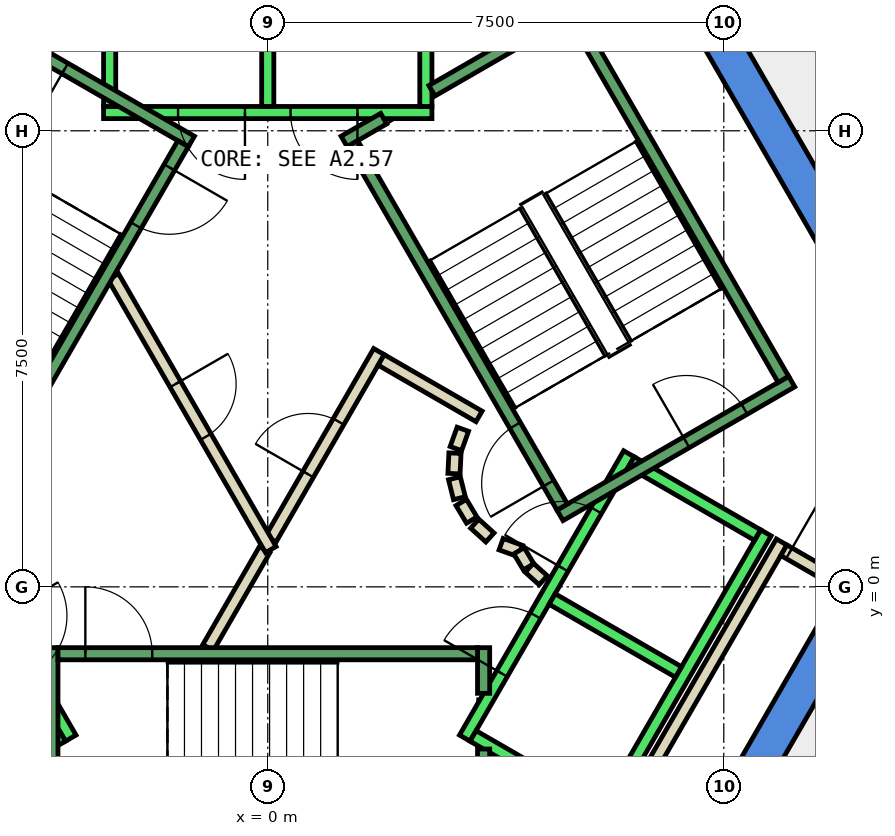
"""IFC4 building model, lengths in metres.
Left out: names, types, materials, properties, quantities, classifications, styles, units other than length and angle.
Written with IfcOpenShell. Run it as: python <this file> out.ifc"""

import sys

from ifc_helpers import new_model, si_unit, direction, frame, frame_2d, origin, place, context, subcontext, project, spatial, polyline, rectangle, outline, extrude, element, fill, save


model = new_model("IFC4")
c1 = context("Model", 3, precision=1e-05, world=origin(), true_north=direction((0.0, 1.0)))
c2 = subcontext(c1, "Body", "Model", "MODEL_VIEW")
j1 = project(units=[si_unit("LENGTHUNIT", "METRE"), si_unit("PLANEANGLEUNIT", "RADIAN")], contexts=[c1])
p1 = place(None, origin())
s1 = spatial("IfcSite", under=j1, at=p1, CompositionType="ELEMENT")
p2 = place(p1, origin())
s2 = spatial("IfcBuilding", under=s1, at=p2, CompositionType="ELEMENT")
p3 = place(p2, frame((0.0, 0.0, 270.2)))
s3 = spatial("IfcBuildingStorey", under=s2, at=p3, CompositionType="ELEMENT", Elevation=270.2)
p4 = place(p3, frame((0.0, 0.0, -0.34)))
e1 = element("IfcWall", 1, at=p4, inside=s3, PredefinedType="SHEAR", context=c2, shape_type="SweptSolid", body=[
    extrude(outline(polyline([(6.786, 10.747), (6.266, 10.447), (10.854, 2.5), (11.547, 2.5), (6.786, 10.747)])), origin(), (0.0, 0.0, 1.0), 3.6),
])
p5 = place(p3, frame((0.0, 0.0, -0.34)))
e2 = element("IfcWall", 2, at=p5, inside=s3, PredefinedType="SHEAR", context=c2, shape_type="SweptSolid", body=[
    extrude(outline(polyline([(5.774, -7.5), (11.547, 2.5), (10.854, 2.5), (5.427, -6.9), (5.774, -7.5)])), origin(), (0.0, 0.0, 1.0), 3.6),
])
p6 = place(p3, frame((5.751, -3.938, 0.0), z_axis=(0.0, 0.0, 1.0), x_axis=(0.500034260056, 0.866005622828, 0.0)))
e3 = element("IfcWall", 3, at=p6, inside=s3, PredefinedType="PARTITIONING", context=c2, shape_type="SweptSolid", body=[
    extrude(rectangle(XDim=5.399, YDim=0.2, at=frame_2d((2.7, 0.0))), origin(), (0.0, 0.0, 1.0), 3.26),
])
p7 = place(p3, frame((8.488, 0.602, 0.0), z_axis=(0.0, 0.0, 1.0), x_axis=(0.866063652425, -0.499933745558, 0.0)))
e4 = element("IfcWall", 4, at=p7, inside=s3, PredefinedType="PARTITIONING", context=c2, shape_type="SweptSolid", body=[
    extrude(rectangle(XDim=1.1, YDim=0.2, at=frame_2d((0.55, 0.0))), origin(), (0.0, 0.0, 1.0), 3.26),
])
p8 = place(p7, frame((0.1, 0.0, 0.0)))
e5 = element("IfcOpeningElement", 5, at=p8, cuts=e4, PredefinedType="OPENING", context=c2, shape_type="SweptSolid", body=[
    extrude(rectangle(XDim=0.9, YDim=2.1, at=frame_2d((0.45, 1.05))), frame((0.0, 0.11, 0.0), z_axis=(0.0, -1.0, 0.0), x_axis=(1.0, 0.0, 0.0)), (0.0, 0.0, 1.0), 0.22),
])
p9 = place(p3, frame((-0.982, -1.0, 0.0), z_axis=(0.0, 0.0, 1.0), x_axis=(0.50024047865, 0.865886518847, 0.0)))
e6 = element("IfcWall", 6, at=p9, inside=s3, PredefinedType="PARTITIONING", context=c2, shape_type="SweptSolid", body=[
    extrude(rectangle(XDim=1.863, YDim=0.2, at=frame_2d((0.931, 0.0))), origin(), (0.0, 0.0, 1.0), 3.26),
])
p10 = place(p3, frame((0.05, 0.787, 0.0), z_axis=(0.0, 0.0, 1.0), x_axis=(0.499954076797, 0.866051915934, 0.0)))
e7 = element("IfcWall", 7, at=p10, inside=s3, PredefinedType="PARTITIONING", context=c2, shape_type="SweptSolid", body=[
    extrude(rectangle(XDim=3.558, YDim=0.2, at=frame_2d((1.779, 0.0))), origin(), (0.0, 0.0, 1.0), 3.26),
])
p11 = place(p10, frame((1.229, 0.0, 0.0)))
e8 = element("IfcOpeningElement", 8, at=p11, cuts=e7, PredefinedType="OPENING", context=c2, shape_type="SweptSolid", body=[
    extrude(rectangle(XDim=1.0, YDim=2.1, at=frame_2d((0.5, 1.05))), frame((0.0, 0.11, 0.0), z_axis=(0.0, -1.0, 0.0), x_axis=(1.0, 0.0, 0.0)), (0.0, 0.0, 1.0), 0.22),
])
p12 = place(p3, frame((1.866, 3.732, 0.0), z_axis=(0.0, 0.0, 1.0), x_axis=(0.866043361281, -0.499968895414, 0.0)))
e9 = element("IfcWall", 9, at=p12, inside=s3, PredefinedType="PARTITIONING", context=c2, shape_type="SweptSolid", body=[
    extrude(rectangle(XDim=1.858, YDim=0.2, at=frame_2d((0.929, 0.0))), origin(), (0.0, 0.0, 1.0), 3.26),
])
p13 = place(p3, frame((3.208, 2.592, 0.0), z_axis=(0.0, 0.0, 1.0), x_axis=(-0.337388820924, -0.941365382578, 0.0)))
e10 = element("IfcWall", 10, at=p13, inside=s3, PredefinedType="PARTITIONING", context=c2, shape_type="SweptSolid", body=[
    extrude(rectangle(XDim=0.338, YDim=0.2, at=frame_2d((0.169, 0.0))), origin(), (0.0, 0.0, 1.0), 3.26),
])
p14 = place(p3, frame((3.079, 2.199, 0.0), z_axis=(0.0, 0.0, 1.0), x_axis=(-0.047771483479, -0.998858290933, 0.0)))
e11 = element("IfcWall", 11, at=p14, inside=s3, PredefinedType="PARTITIONING", context=c2, shape_type="SweptSolid", body=[
    extrude(rectangle(XDim=0.337, YDim=0.2, at=frame_2d((0.169, 0.0))), origin(), (0.0, 0.0, 1.0), 3.26),
])
p15 = place(p3, frame((3.07, 1.786, 0.0), z_axis=(0.0, 0.0, 1.0), x_axis=(0.242705583207, -0.970099994784, 0.0)))
e12 = element("IfcWall", 12, at=p15, inside=s3, PredefinedType="PARTITIONING", context=c2, shape_type="SweptSolid", body=[
    extrude(rectangle(XDim=0.338, YDim=0.2, at=frame_2d((0.169, 0.0))), origin(), (0.0, 0.0, 1.0), 3.26),
])
for number, where, z_axis, x_axis in (
    (13, (3.182, 1.388, 0.0), (0.0, 0.0, 1.0), (0.512, -0.859, 0.0)),
    (14, (3.404, 1.039, 0.0), (0.0, 0.0, 1.0), (0.74, -0.672, 0.0)),
):
    element("IfcWall", number, at=place(p3, frame(where, z_axis=z_axis, x_axis=x_axis)), inside=s3, PredefinedType="PARTITIONING", context=c2, shape_type="SweptSolid", body=[
        extrude(rectangle(XDim=0.338, YDim=0.2, at=frame_2d((0.169, 0.0))), origin(), (0.0, 0.0, 1.0), 3.26),
    ])
p16 = place(p3, frame((3.838, 0.702, 0.0), z_axis=(0.0, 0.0, 1.0), x_axis=(0.941035081519, -0.338308993895, 0.0)))
e15 = element("IfcWall", 15, at=p16, inside=s3, PredefinedType="PARTITIONING", context=c2, shape_type="SweptSolid", body=[
    extrude(rectangle(XDim=0.337, YDim=0.2, at=frame_2d((0.168, 0.0))), origin(), (0.0, 0.0, 1.0), 3.26),
])
p17 = place(p3, frame((4.132, 0.593, 0.0), z_axis=(0.0, 0.0, 1.0), x_axis=(0.513561617048, -0.858052717201, 0.0)))
e16 = element("IfcWall", 16, at=p17, inside=s3, PredefinedType="PARTITIONING", context=c2, shape_type="SweptSolid", body=[
    extrude(rectangle(XDim=0.308, YDim=0.2, at=frame_2d((0.154, 0.0))), origin(), (0.0, 0.0, 1.0), 3.26),
])
p18 = place(p3, frame((4.301, 0.315, 0.0), z_axis=(0.0, 0.0, 1.0), x_axis=(0.741798017506, -0.670623367639, 0.0)))
e17 = element("IfcWall", 17, at=p18, inside=s3, PredefinedType="PARTITIONING", context=c2, shape_type="SweptSolid", body=[
    extrude(rectangle(XDim=0.309, YDim=0.2, at=frame_2d((0.154, 0.0))), origin(), (0.0, 0.0, 1.0), 3.26),
])
p19 = place(p3, frame((-2.54, 5.1, 0.0), z_axis=(0.0, 0.0, 1.0), x_axis=(0.499925051871, -0.866068670783, 0.0)))
e18 = element("IfcWall", 18, at=p19, inside=s3, PredefinedType="PARTITIONING", context=c2, shape_type="SweptSolid", body=[
    extrude(rectangle(XDim=5.181, YDim=0.2, at=frame_2d((2.59, 0.0))), origin(), (0.0, 0.0, 1.0), 3.26),
])
p20 = place(p19, frame((2.04, 0.0, 0.0)))
e19 = element("IfcOpeningElement", 19, at=p20, cuts=e18, PredefinedType="OPENING", context=c2, shape_type="SweptSolid", body=[
    extrude(rectangle(XDim=1.0, YDim=2.1, at=frame_2d((0.5, 1.05))), frame((0.0, 0.11, 0.0), z_axis=(0.0, -1.0, 0.0), x_axis=(1.0, 0.0, 0.0)), (0.0, 0.0, 1.0), 0.22),
])
p21 = place(p3, frame((2.7, 7.8, 0.0), z_axis=(0.0, 0.0, 1.0), x_axis=(-1.0, 0.0, 0.0)))
e20 = element("IfcWall", 20, at=p21, inside=s3, PredefinedType="STANDARD", context=c2, shape_type="SweptSolid", body=[
    extrude(rectangle(XDim=5.4, YDim=0.2, at=frame_2d((2.7, 0.0))), origin(), (0.0, 0.0, 1.0), 3.26),
])
p22 = place(p21, frame((1.225, 0.0, 0.0)))
e21 = element("IfcOpeningElement", 21, at=p22, cuts=e20, PredefinedType="OPENING", context=c2, shape_type="SweptSolid", body=[
    extrude(rectangle(XDim=1.1, YDim=2.1, at=frame_2d((0.55, 1.05))), frame((0.0, 0.11, 0.0), z_axis=(0.0, -1.0, 0.0), x_axis=(1.0, 0.0, 0.0)), (0.0, 0.0, 1.0), 0.22),
])
p23 = place(p21, frame((3.075, 0.0, 0.0)))
e22 = element("IfcOpeningElement", 22, at=p23, cuts=e20, PredefinedType="OPENING", context=c2, shape_type="SweptSolid", body=[
    extrude(rectangle(XDim=1.1, YDim=2.1, at=frame_2d((0.55, 1.05))), frame((0.0, 0.11, 0.0), z_axis=(0.0, -1.0, 0.0), x_axis=(1.0, 0.0, 0.0)), (0.0, 0.0, 1.0), 0.22),
])
for number, where, z_axis, x_axis in (
    (23, (2.6, 7.9, 0.0), (0.0, 0.0, 1.0), (0.0, 1.0, 0.0)),
    (24, (0.0, 7.9, 0.0), (0.0, 0.0, 1.0), (0.0, 1.0, 0.0)),
    (25, (-2.6, 7.9, 0.0), (0.0, 0.0, 1.0), (0.0, 1.0, 0.0)),
):
    element("IfcWall", number, at=place(p3, frame(where, z_axis=z_axis, x_axis=x_axis)), inside=s3, PredefinedType="STANDARD", context=c2, shape_type="SweptSolid", body=[
        extrude(rectangle(XDim=2.4, YDim=0.2, at=frame_2d((1.2, 0.0))), origin(), (0.0, 0.0, 1.0), 3.26),
    ])
p24 = place(p3, frame((-5.94, 2.188, 0.0), z_axis=(0.0, 0.0, 1.0), x_axis=(0.500034260056, -0.866005622828, 0.0)))
e26 = element("IfcWall", 26, at=p24, inside=s3, PredefinedType="STANDARD", context=c2, shape_type="SweptSolid", body=[
    extrude(rectangle(XDim=5.399, YDim=0.2, at=frame_2d((2.7, 0.0))), origin(), (0.0, 0.0, 1.0), 3.26),
])
p25 = place(p24, frame((3.075, 0.0, 0.0)))
e27 = element("IfcOpeningElement", 27, at=p25, cuts=e26, PredefinedType="OPENING", context=c2, shape_type="SweptSolid", body=[
    extrude(rectangle(XDim=1.1, YDim=2.1, at=frame_2d((0.55, 1.05))), frame((0.0, 0.11, 0.0), z_axis=(0.0, -1.0, 0.0), x_axis=(1.0, 0.0, 0.0)), (0.0, 0.0, 1.0), 0.22),
])
p26 = place(p24, frame((1.225, 0.0, 0.0)))
e28 = element("IfcOpeningElement", 28, at=p26, cuts=e26, PredefinedType="OPENING", context=c2, shape_type="SweptSolid", body=[
    extrude(rectangle(XDim=1.1, YDim=2.1, at=frame_2d((0.55, 1.05))), frame((0.0, 0.11, 0.0), z_axis=(0.0, -1.0, 0.0), x_axis=(1.0, 0.0, 0.0)), (0.0, 0.0, 1.0), 0.22),
])
p27 = place(p3, frame((-3.377, -2.452, 0.0), z_axis=(0.0, 0.0, 1.0), x_axis=(-0.865955154139, -0.50012165622, 0.0)))
e29 = element("IfcWall", 29, at=p27, inside=s3, PredefinedType="STANDARD", context=c2, shape_type="SweptSolid", body=[
    extrude(rectangle(XDim=2.4, YDim=0.2, at=frame_2d((1.2, 0.0))), origin(), (0.0, 0.0, 1.0), 3.26),
])
p28 = place(p3, frame((3.24, -2.488, 0.0), z_axis=(0.0, 0.0, 1.0), x_axis=(0.500034260056, 0.866005622828, 0.0)))
e30 = element("IfcWall", 30, at=p28, inside=s3, PredefinedType="STANDARD", context=c2, shape_type="SweptSolid", body=[
    extrude(rectangle(XDim=5.399, YDim=0.2, at=frame_2d((2.7, 0.0))), origin(), (0.0, 0.0, 1.0), 3.26),
])
p29 = place(p28, frame((3.225, 0.0, 0.0)))
e31 = element("IfcOpeningElement", 31, at=p29, cuts=e30, PredefinedType="OPENING", context=c2, shape_type="SweptSolid", body=[
    extrude(rectangle(XDim=1.1, YDim=2.1, at=frame_2d((0.55, 1.05))), frame((0.0, 0.11, 0.0), z_axis=(0.0, -1.0, 0.0), x_axis=(1.0, 0.0, 0.0)), (0.0, 0.0, 1.0), 0.22),
])
p30 = place(p28, frame((1.225, 0.0, 0.0)))
e32 = element("IfcOpeningElement", 32, at=p30, cuts=e30, PredefinedType="OPENING", context=c2, shape_type="SweptSolid", body=[
    extrude(rectangle(XDim=1.1, YDim=2.1, at=frame_2d((0.55, 1.05))), frame((0.0, 0.11, 0.0), z_axis=(0.0, -1.0, 0.0), x_axis=(1.0, 0.0, 0.0)), (0.0, 0.0, 1.0), 0.22),
])
p31 = place(p3, frame((5.492, -3.788, 0.0), z_axis=(0.0, 0.0, 1.0), x_axis=(0.500034260056, 0.866005622828, 0.0)))
e33 = element("IfcWall", 33, at=p31, inside=s3, PredefinedType="STANDARD", context=c2, shape_type="SweptSolid", body=[
    extrude(rectangle(XDim=5.399, YDim=0.2, at=frame_2d((2.7, 0.0))), origin(), (0.0, 0.0, 1.0), 3.26),
])
p32 = place(p3, frame((3.377, -2.452, 0.0), z_axis=(0.0, 0.0, 1.0), x_axis=(0.865955154139, -0.50012165622, 0.0)))
e34 = element("IfcWall", 34, at=p32, inside=s3, PredefinedType="STANDARD", context=c2, shape_type="SweptSolid", body=[
    extrude(rectangle(XDim=2.4, YDim=0.2, at=frame_2d((1.2, 0.0))), origin(), (0.0, 0.0, 1.0), 3.26),
])
for number, where, z_axis, x_axis in (
    (35, (4.677, -0.2, 0.0), (0.0, 0.0, 1.0), (0.866, -0.5, 0.0)),
    (36, (5.977, 2.052, 0.0), (0.0, 0.0, 1.0), (0.866, -0.5, 0.0)),
):
    element("IfcWall", number, at=place(p3, frame(where, z_axis=z_axis, x_axis=x_axis)), inside=s3, PredefinedType="STANDARD", context=c2, shape_type="SweptSolid", body=[
        extrude(rectangle(XDim=2.399, YDim=0.2, at=frame_2d((1.2, 0.0))), origin(), (0.0, 0.0, 1.0), 3.26),
    ])
p33 = place(p3, frame((-3.55, -1.0, 0.0), z_axis=(0.0, 0.0, 1.0), x_axis=(0.0, -1.0, 0.0)))
e37 = element("IfcWall", 37, at=p33, inside=s3, PredefinedType="STANDARD", context=c2, shape_type="SweptSolid", body=[
    extrude(rectangle(XDim=4.4, YDim=0.2, at=frame_2d((2.2, 0.0))), origin(), (0.0, 0.0, 1.0), 3.26),
])
p34 = place(p33, frame((2.4, 0.0, 0.0)))
e38 = element("IfcOpeningElement", 38, at=p34, cuts=e37, PredefinedType="OPENING", context=c2, shape_type="SweptSolid", body=[
    extrude(rectangle(XDim=1.1, YDim=2.2, at=frame_2d((0.55, 1.1))), frame((0.0, 0.11, 0.0), z_axis=(0.0, -1.0, 0.0), x_axis=(1.0, 0.0, 0.0)), (0.0, 0.0, 1.0), 0.22),
])
p35 = place(p3, frame((3.55, -2.667, 0.0), z_axis=(0.0, 0.0, 1.0), x_axis=(0.0, -1.0, 0.0)))
e39 = element("IfcWall", 39, at=p35, inside=s3, PredefinedType="STANDARD", context=c2, shape_type="SweptSolid", body=[
    extrude(rectangle(XDim=2.733, YDim=0.2, at=frame_2d((1.366, 0.0))), origin(), (0.0, 0.0, 1.0), 3.26),
])
p36 = place(p3, frame((3.55, -1.0, 0.0), z_axis=(0.0, 0.0, 1.0), x_axis=(0.0, -1.0, 0.0)))
e40 = element("IfcWall", 40, at=p36, inside=s3, PredefinedType="STANDARD", context=c2, shape_type="SweptSolid", body=[
    extrude(rectangle(XDim=0.751, YDim=0.2, at=frame_2d((0.375, 0.0))), origin(), (0.0, 0.0, 1.0), 3.26),
])
p37 = place(p3, frame((-3.45, -1.1, 0.0), z_axis=(0.0, 0.0, 1.0), x_axis=(1.0, 0.0, 0.0)))
e41 = element("IfcWall", 41, at=p37, inside=s3, PredefinedType="STANDARD", context=c2, shape_type="SweptSolid", body=[
    extrude(rectangle(XDim=6.9, YDim=0.2, at=frame_2d((3.45, 0.0))), origin(), (0.0, 0.0, 1.0), 3.26),
])
p38 = place(p37, frame((0.45, 0.0, 0.0)))
e42 = element("IfcOpeningElement", 42, at=p38, cuts=e41, PredefinedType="OPENING", context=c2, shape_type="SweptSolid", body=[
    extrude(rectangle(XDim=1.1, YDim=2.2, at=frame_2d((0.55, 1.1))), frame((0.0, 0.11, 0.0), z_axis=(0.0, -1.0, 0.0), x_axis=(1.0, 0.0, 0.0)), (0.0, 0.0, 1.0), 0.22),
])
p39 = place(p3, frame((4.806, 1.176, 0.0), z_axis=(0.0, 0.0, 1.0), x_axis=(0.866059941101, 0.499940174841, 0.0)))
e43 = element("IfcWall", 43, at=p39, inside=s3, PredefinedType="STANDARD", context=c2, shape_type="SweptSolid", body=[
    extrude(rectangle(XDim=4.4, YDim=0.2, at=frame_2d((2.2, 0.0))), origin(), (0.0, 0.0, 1.0), 3.26),
])
p40 = place(p39, frame((2.4, 0.0, 0.0)))
e44 = element("IfcOpeningElement", 44, at=p40, cuts=e43, PredefinedType="OPENING", context=c2, shape_type="SweptSolid", body=[
    extrude(rectangle(XDim=1.1, YDim=2.2, at=frame_2d((0.55, 1.1))), frame((0.0, 0.11, 0.0), z_axis=(0.0, -1.0, 0.0), x_axis=(1.0, 0.0, 0.0)), (0.0, 0.0, 1.0), 0.22),
])
p41 = place(p3, frame((2.7, 8.158, 0.0), z_axis=(0.0, 0.0, 1.0), x_axis=(0.86611865017, 0.499838457731, 0.0)))
e45 = element("IfcWall", 45, at=p41, inside=s3, PredefinedType="STANDARD", context=c2, shape_type="SweptSolid", body=[
    extrude(rectangle(XDim=2.733, YDim=0.2, at=frame_2d((1.366, 0.0))), origin(), (0.0, 0.0, 1.0), 3.26),
])
p42 = place(p3, frame((1.256, 7.324, 0.0), z_axis=(0.0, 0.0, 1.0), x_axis=(0.865915093549, 0.500191014278, 0.0)))
e46 = element("IfcWall", 46, at=p42, inside=s3, PredefinedType="STANDARD", context=c2, shape_type="SweptSolid", body=[
    extrude(rectangle(XDim=0.752, YDim=0.2, at=frame_2d((0.376, 0.0))), origin(), (0.0, 0.0, 1.0), 3.26),
])
p43 = place(p3, frame((4.843, 1.312, 0.0), z_axis=(0.0, 0.0, 1.0), x_axis=(-0.499963383562, 0.866046543262, 0.0)))
e47 = element("IfcWall", 47, at=p43, inside=s3, PredefinedType="STANDARD", context=c2, shape_type="SweptSolid", body=[
    extrude(rectangle(XDim=6.9, YDim=0.2, at=frame_2d((3.45, 0.0))), origin(), (0.0, 0.0, 1.0), 3.26),
])
p44 = place(p43, frame((0.45, 0.0, 0.0)))
e48 = element("IfcOpeningElement", 48, at=p44, cuts=e47, PredefinedType="OPENING", context=c2, shape_type="SweptSolid", body=[
    extrude(rectangle(XDim=1.1, YDim=2.2, at=frame_2d((0.55, 1.1))), frame((0.0, 0.11, 0.0), z_axis=(0.0, -1.0, 0.0), x_axis=(1.0, 0.0, 0.0)), (0.0, 0.0, 1.0), 0.22),
])
p45 = place(p3, frame((8.48, 3.412, 0.0), z_axis=(0.0, 0.0, 1.0), x_axis=(-0.499978703459, 0.866037698999, 0.0)))
e49 = element("IfcWall", 49, at=p45, inside=s3, PredefinedType="STANDARD", context=c2, shape_type="SweptSolid", body=[
    extrude(rectangle(XDim=6.9, YDim=0.2, at=frame_2d((3.45, 0.0))), origin(), (0.0, 0.0, 1.0), 3.26),
])
p46 = place(p3, frame((-1.256, 7.324, 0.0), z_axis=(0.0, 0.0, 1.0), x_axis=(-0.866046073146, 0.499964197906, 0.0)))
e50 = element("IfcWall", 50, at=p46, inside=s3, PredefinedType="STANDARD", context=c2, shape_type="SweptSolid", body=[
    extrude(rectangle(XDim=4.4, YDim=0.2, at=frame_2d((2.2, 0.0))), origin(), (0.0, 0.0, 1.0), 3.26),
])
p47 = place(p46, frame((2.4, 0.0, 0.0)))
e51 = element("IfcOpeningElement", 51, at=p47, cuts=e50, PredefinedType="OPENING", context=c2, shape_type="SweptSolid", body=[
    extrude(rectangle(XDim=1.1, YDim=2.2, at=frame_2d((0.55, 1.1))), frame((0.0, 0.11, 0.0), z_axis=(0.0, -1.0, 0.0), x_axis=(1.0, 0.0, 0.0)), (0.0, 0.0, 1.0), 0.22),
])
p48 = place(p3, frame((-1.393, 7.288, 0.0), z_axis=(0.0, 0.0, 1.0), x_axis=(-0.499963383562, -0.866046543262, 0.0)))
e52 = element("IfcWall", 52, at=p48, inside=s3, PredefinedType="STANDARD", context=c2, shape_type="SweptSolid", body=[
    extrude(rectangle(XDim=6.9, YDim=0.2, at=frame_2d((3.45, 0.0))), origin(), (0.0, 0.0, 1.0), 3.26),
])
p49 = place(p48, frame((0.45, 0.0, 0.0)))
e53 = element("IfcOpeningElement", 53, at=p49, cuts=e52, PredefinedType="OPENING", context=c2, shape_type="SweptSolid", body=[
    extrude(rectangle(XDim=1.1, YDim=2.2, at=frame_2d((0.55, 1.1))), frame((0.0, 0.11, 0.0), z_axis=(0.0, -1.0, 0.0), x_axis=(1.0, 0.0, 0.0)), (0.0, 0.0, 1.0), 0.22),
])
p50 = place(p11, origin())
e54 = element("IfcDoor", 54, at=p50, inside=s3, OperationType="SINGLE_SWING_RIGHT", PredefinedType="DOOR", context=c2, shape_type="SweptSolid", body=[
    extrude(rectangle(XDim=1.0, YDim=2.1, at=frame_2d((0.5, 1.05))), frame((0.0, 0.025, 0.0), z_axis=(0.0, -1.0, 0.0), x_axis=(1.0, 0.0, 0.0)), (0.0, 0.0, 1.0), 0.05),
])
fill(e8, e54)
p51 = place(p20, origin())
e55 = element("IfcDoor", 55, at=p51, inside=s3, OperationType="SINGLE_SWING_RIGHT", PredefinedType="DOOR", context=c2, shape_type="SweptSolid", body=[
    extrude(rectangle(XDim=1.0, YDim=2.1, at=frame_2d((0.5, 1.05))), frame((0.0, 0.025, 0.0), z_axis=(0.0, -1.0, 0.0), x_axis=(1.0, 0.0, 0.0)), (0.0, 0.0, 1.0), 0.05),
])
fill(e19, e55)
p52 = place(p8, origin())
e56 = element("IfcDoor", 56, at=p52, inside=s3, OperationType="SINGLE_SWING_RIGHT", PredefinedType="DOOR", context=c2, shape_type="SweptSolid", body=[
    extrude(rectangle(XDim=0.9, YDim=2.1, at=frame_2d((0.45, 1.05))), frame((0.0, 0.025, 0.0), z_axis=(0.0, -1.0, 0.0), x_axis=(1.0, 0.0, 0.0)), (0.0, 0.0, 1.0), 0.05),
])
fill(e5, e56)
p53 = place(p22, origin())
e57 = element("IfcDoor", 57, at=p53, inside=s3, OperationType="SLIDING_TO_LEFT", PredefinedType="DOOR", context=c2, shape_type="SweptSolid", body=[
    extrude(rectangle(XDim=1.1, YDim=2.1, at=frame_2d((0.55, 1.05))), frame((0.0, 0.025, 0.0), z_axis=(0.0, -1.0, 0.0), x_axis=(1.0, 0.0, 0.0)), (0.0, 0.0, 1.0), 0.05),
])
fill(e21, e57)
p54 = place(p23, origin())
e58 = element("IfcDoor", 58, at=p54, inside=s3, OperationType="SLIDING_TO_LEFT", PredefinedType="DOOR", context=c2, shape_type="SweptSolid", body=[
    extrude(rectangle(XDim=1.1, YDim=2.1, at=frame_2d((0.55, 1.05))), frame((0.0, 0.025, 0.0), z_axis=(0.0, -1.0, 0.0), x_axis=(1.0, 0.0, 0.0)), (0.0, 0.0, 1.0), 0.05),
])
fill(e22, e58)
p55 = place(p29, origin())
e59 = element("IfcDoor", 59, at=p55, inside=s3, OperationType="SLIDING_TO_LEFT", PredefinedType="DOOR", context=c2, shape_type="SweptSolid", body=[
    extrude(rectangle(XDim=1.1, YDim=2.1, at=frame_2d((0.55, 1.05))), frame((0.0, 0.025, 0.0), z_axis=(0.0, -1.0, 0.0), x_axis=(1.0, 0.0, 0.0)), (0.0, 0.0, 1.0), 0.05),
])
fill(e31, e59)
p56 = place(p30, origin())
e60 = element("IfcDoor", 60, at=p56, inside=s3, OperationType="SLIDING_TO_LEFT", PredefinedType="DOOR", context=c2, shape_type="SweptSolid", body=[
    extrude(rectangle(XDim=1.1, YDim=2.1, at=frame_2d((0.55, 1.05))), frame((0.0, 0.025, 0.0), z_axis=(0.0, -1.0, 0.0), x_axis=(1.0, 0.0, 0.0)), (0.0, 0.0, 1.0), 0.05),
])
fill(e32, e60)
p57 = place(p38, origin())
e61 = element("IfcDoor", 61, at=p57, inside=s3, OperationType="SINGLE_SWING_LEFT", PredefinedType="DOOR", context=c2, shape_type="SweptSolid", body=[
    extrude(rectangle(XDim=1.1, YDim=2.2, at=frame_2d((0.55, 1.1))), frame((0.0, 0.025, 0.0), z_axis=(0.0, -1.0, 0.0), x_axis=(1.0, 0.0, 0.0)), (0.0, 0.0, 1.0), 0.05),
])
fill(e42, e61)
p58 = place(p44, origin())
e62 = element("IfcDoor", 62, at=p58, inside=s3, OperationType="SINGLE_SWING_LEFT", PredefinedType="DOOR", context=c2, shape_type="SweptSolid", body=[
    extrude(rectangle(XDim=1.1, YDim=2.2, at=frame_2d((0.55, 1.1))), frame((0.0, 0.025, 0.0), z_axis=(0.0, -1.0, 0.0), x_axis=(1.0, 0.0, 0.0)), (0.0, 0.0, 1.0), 0.05),
])
fill(e48, e62)
p59 = place(p40, origin())
e63 = element("IfcDoor", 63, at=p59, inside=s3, OperationType="SINGLE_SWING_LEFT", PredefinedType="DOOR", context=c2, shape_type="SweptSolid", body=[
    extrude(rectangle(XDim=1.1, YDim=2.2, at=frame_2d((0.55, 1.1))), frame((0.0, 0.025, 0.0), z_axis=(0.0, -1.0, 0.0), x_axis=(1.0, 0.0, 0.0)), (0.0, 0.0, 1.0), 0.05),
])
fill(e44, e63)
p60 = place(p49, origin())
e64 = element("IfcDoor", 64, at=p60, inside=s3, OperationType="SINGLE_SWING_LEFT", PredefinedType="DOOR", context=c2, shape_type="SweptSolid", body=[
    extrude(rectangle(XDim=1.1, YDim=2.2, at=frame_2d((0.55, 1.1))), frame((0.0, 0.025, 0.0), z_axis=(0.0, -1.0, 0.0), x_axis=(1.0, 0.0, 0.0)), (0.0, 0.0, 1.0), 0.05),
])
fill(e53, e64)
p61 = place(p47, origin())
e65 = element("IfcDoor", 65, at=p61, inside=s3, OperationType="SINGLE_SWING_LEFT", PredefinedType="DOOR", context=c2, shape_type="SweptSolid", body=[
    extrude(rectangle(XDim=1.1, YDim=2.2, at=frame_2d((0.55, 1.1))), frame((0.0, 0.025, 0.0), z_axis=(0.0, -1.0, 0.0), x_axis=(1.0, 0.0, 0.0)), (0.0, 0.0, 1.0), 0.05),
])
fill(e51, e65)
save(model, sys.argv[1])
